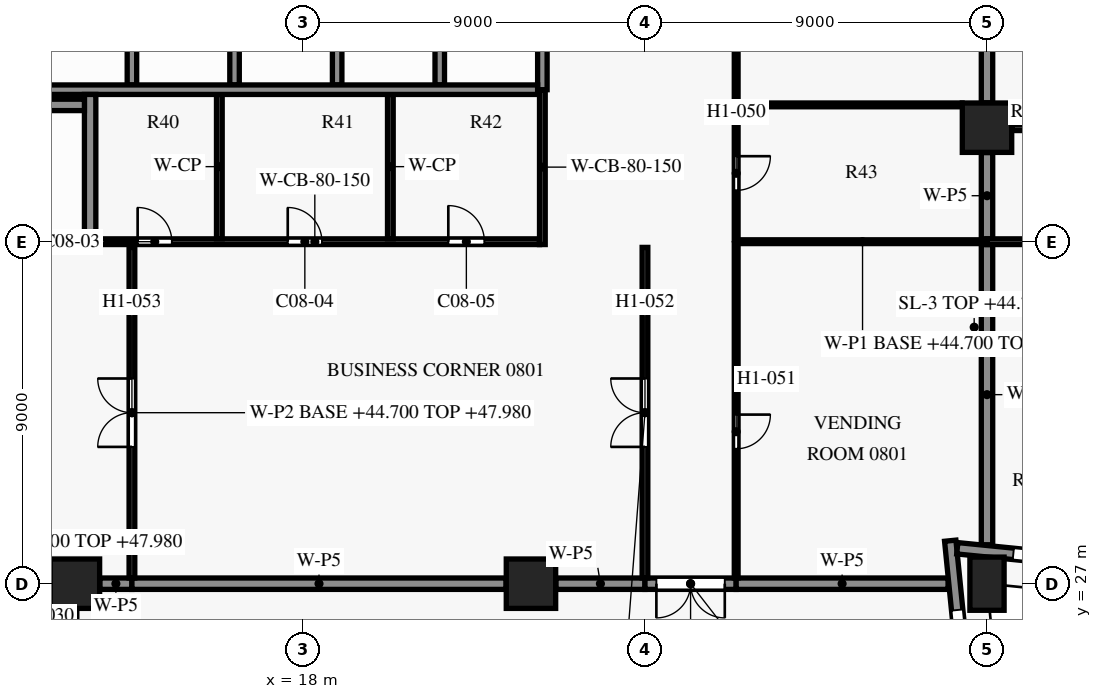
"""IFC4 building model, lengths in metres.
Left out: names, types, materials, properties, quantities, classifications, styles, units other than length and angle.
Written with IfcOpenShell. Run it as: python <this file> out.ifc"""

import sys

from ifc_helpers import new_model, si_unit, direction, frame, frame_2d, origin, origin_2d, place, context, subcontext, project, spatial, rectangle, extrude, element, fill, save


model = new_model("IFC4")
c1 = context("Model", 3, precision=1e-05, world=origin(), true_north=direction((0.0, 1.0)))
c2 = subcontext(c1, "Body", "Model", "MODEL_VIEW")
j1 = project(units=[si_unit("LENGTHUNIT", "METRE"), si_unit("PLANEANGLEUNIT", "RADIAN")], contexts=[c1])
p1 = place(None, origin())
s1 = spatial("IfcSite", under=j1, at=p1, CompositionType="ELEMENT")
p2 = place(p1, origin())
s2 = spatial("IfcBuilding", under=s1, at=p2, CompositionType="ELEMENT")
p3 = place(p2, frame((0.0, 0.0, 44.7)))
s3 = spatial("IfcBuildingStorey", under=s2, at=p3, CompositionType="ELEMENT", Elevation=44.7)
p4 = place(p3, frame((36.0, 27.0, 0.0), z_axis=(0.0, 0.0, 1.0), x_axis=(-0.0995038382, 0.995037178292, 0.0)))
e1 = element("IfcColumn", 1, at=p4, inside=s3, PredefinedType="COLUMN", context=c2, shape_type="SweptSolid", body=[
    extrude(rectangle(XDim=0.9, YDim=1.4, at=origin_2d()), origin(), (0.0, 0.0, 1.0), 3.6),
])
for number, where, z_axis, x_axis in (
    (2, (12.0, 27.0, 0.0), (0.0, 0.0, 1.0), (1.0, 0.0, 0.0)),
    (3, (24.0, 27.0, 0.0), (0.0, 0.0, 1.0), (1.0, 0.0, 0.0)),
    (4, (36.0, 39.0, 0.0), (0.0, 0.0, 1.0), (1.0, 0.0, 0.0)),
):
    element("IfcColumn", number, at=place(p3, frame(where, z_axis=z_axis, x_axis=x_axis)), inside=s3, PredefinedType="COLUMN", context=c2, shape_type="SweptSolid", body=[
        extrude(rectangle(XDim=1.3, YDim=1.3, at=origin_2d()), origin(), (0.0, 0.0, 1.0), 3.6),
    ])
p5 = place(p3, frame((35.033, 28.132, 0.0), z_axis=(0.0, 0.0, 1.0), x_axis=(0.099487051997, -0.995038856771, 0.0)))
e5 = element("IfcWall", 5, at=p5, inside=s3, PredefinedType="SOLIDWALL", context=c2, shape_type="SweptSolid", body=[
    extrude(rectangle(XDim=10.152, YDim=0.3, at=frame_2d((5.076, 0.0))), origin(), (0.0, 0.0, 1.0), 2.95),
])
p6 = place(p5, frame((1.833, 0.0, 0.15)))
e6 = element("IfcOpeningElement", 6, at=p6, cuts=e5, PredefinedType="OPENING", context=c2, shape_type="SweptSolid", body=[
    extrude(rectangle(XDim=3.3, YDim=2.4, at=frame_2d((1.65, 1.2))), frame((0.0, 0.16, 0.0), z_axis=(0.0, -1.0, 0.0), x_axis=(1.0, 0.0, 0.0)), (0.0, 0.0, 1.0), 0.32),
])
p7 = place(p5, frame((7.106, 0.0, 0.75)))
e7 = element("IfcOpeningElement", 7, at=p7, cuts=e5, PredefinedType="OPENING", context=c2, shape_type="SweptSolid", body=[
    extrude(rectangle(XDim=1.8, YDim=1.8, at=frame_2d((0.9, 0.9))), frame((0.0, 0.16, 0.0), z_axis=(0.0, -1.0, 0.0), x_axis=(1.0, 0.0, 0.0)), (0.0, 0.0, 1.0), 0.32),
])
p8 = place(p3, frame((45.015, 26.953, 0.0), z_axis=(0.0, 0.0, 1.0), x_axis=(-0.995036699177, 0.099508629231, 0.0)))
e8 = element("IfcWall", 8, at=p8, inside=s3, PredefinedType="SOLIDWALL", context=c2, shape_type="SweptSolid", body=[
    extrude(rectangle(XDim=9.846, YDim=0.3, at=frame_2d((4.923, 0.0))), origin(), (0.0, 0.0, 1.0), 2.95),
])
p9 = place(p8, frame((1.291, 0.0, 0.75)))
e9 = element("IfcOpeningElement", 9, at=p9, cuts=e8, PredefinedType="OPENING", context=c2, shape_type="SweptSolid", body=[
    extrude(rectangle(XDim=1.8, YDim=1.8, at=frame_2d((0.9, 0.9))), frame((0.0, 0.16, 0.0), z_axis=(0.0, -1.0, 0.0), x_axis=(1.0, 0.0, 0.0)), (0.0, 0.0, 1.0), 0.32),
])
p10 = place(p8, frame((5.064, 0.0, 0.15)))
e10 = element("IfcOpeningElement", 10, at=p10, cuts=e8, PredefinedType="OPENING", context=c2, shape_type="SweptSolid", body=[
    extrude(rectangle(XDim=3.3, YDim=2.4, at=frame_2d((1.65, 1.2))), frame((0.0, 0.16, 0.0), z_axis=(0.0, -1.0, 0.0), x_axis=(1.0, 0.0, 0.0)), (0.0, 0.0, 1.0), 0.32),
])
p11 = place(p3, frame((12.4, 36.0, 0.0), z_axis=(0.0, 0.0, 1.0), x_axis=(1.0, 0.0, 0.0)))
e11 = element("IfcWall", 11, at=p11, inside=s3, PredefinedType="SHEAR", context=c2, shape_type="SweptSolid", body=[
    extrude(rectangle(XDim=11.825, YDim=0.15, at=frame_2d((5.913, 0.0))), origin(), (0.0, 0.0, 1.0), 3.3),
])
p12 = place(p11, frame((1.25, 0.0, 0.0)))
e12 = element("IfcOpeningElement", 12, at=p12, cuts=e11, PredefinedType="OPENING", context=c2, shape_type="SweptSolid", body=[
    extrude(rectangle(XDim=0.9, YDim=2.1, at=frame_2d((0.45, 1.05))), frame((0.0, 0.085, 0.0), z_axis=(0.0, -1.0, 0.0), x_axis=(1.0, 0.0, 0.0)), (0.0, 0.0, 1.0), 0.17),
])
p13 = place(p11, frame((5.2, 0.0, 0.0)))
e13 = element("IfcOpeningElement", 13, at=p13, cuts=e11, PredefinedType="OPENING", context=c2, shape_type="SweptSolid", body=[
    extrude(rectangle(XDim=0.9, YDim=2.1, at=frame_2d((0.45, 1.05))), frame((0.0, 0.085, 0.0), z_axis=(0.0, -1.0, 0.0), x_axis=(1.0, 0.0, 0.0)), (0.0, 0.0, 1.0), 0.17),
])
p14 = place(p11, frame((9.425, 0.0, 0.0)))
e14 = element("IfcOpeningElement", 14, at=p14, cuts=e11, PredefinedType="OPENING", context=c2, shape_type="SweptSolid", body=[
    extrude(rectangle(XDim=0.95, YDim=2.1, at=frame_2d((0.475, 1.05))), frame((0.0, 0.085, 0.0), z_axis=(0.0, -1.0, 0.0), x_axis=(1.0, 0.0, 0.0)), (0.0, 0.0, 1.0), 0.17),
])
p15 = place(p3, frame((4.4, 36.0, 0.0), z_axis=(0.0, 0.0, 1.0), x_axis=(1.0, 0.0, 0.0)))
e15 = element("IfcWall", 15, at=p15, inside=s3, PredefinedType="SHEAR", context=c2, shape_type="SweptSolid", body=[
    extrude(rectangle(XDim=8.0, YDim=0.3, at=frame_2d((4.0, 0.0))), origin(), (0.0, 0.0, 1.0), 3.3),
])
p16 = place(p15, frame((0.3, 0.0, 0.0)))
e16 = element("IfcOpeningElement", 16, at=p16, cuts=e15, PredefinedType="OPENING", context=c2, shape_type="SweptSolid", body=[
    extrude(rectangle(XDim=1.5, YDim=2.2, at=frame_2d((0.75, 1.1))), frame((0.0, 0.16, 0.0), z_axis=(0.0, -1.0, 0.0), x_axis=(1.0, 0.0, 0.0)), (0.0, 0.0, 1.0), 0.32),
])
p17 = place(p3, frame((4.55, 39.6, 0.0), z_axis=(0.0, 0.0, 1.0), x_axis=(1.0, 0.0, 0.0)))
e17 = element("IfcWall", 17, at=p17, inside=s3, PredefinedType="SHEAR", context=c2, shape_type="SweptSolid", body=[
    extrude(rectangle(XDim=7.7, YDim=0.3, at=frame_2d((3.85, 0.0))), origin(), (0.0, 0.0, 1.0), 3.3),
])
p18 = place(p3, frame((8.1, 40.0, 0.0), z_axis=(0.0, 0.0, 1.0), x_axis=(1.0, 0.0, 0.0)))
e18 = element("IfcWall", 18, at=p18, inside=s3, PredefinedType="SHEAR", context=c2, shape_type="SweptSolid", body=[
    extrude(rectangle(XDim=16.075, YDim=0.25, at=frame_2d((8.038, 0.0))), origin(), (0.0, 0.0, 1.0), 3.3),
])
p19 = place(p3, frame((12.4, 36.15, 0.0), z_axis=(0.0, 0.0, 1.0), x_axis=(0.0, 1.0, 0.0)))
e19 = element("IfcWall", 19, at=p19, inside=s3, PredefinedType="SHEAR", context=c2, shape_type="SweptSolid", body=[
    extrude(rectangle(XDim=3.725, YDim=0.3, at=frame_2d((1.863, 0.0))), origin(), (0.0, 0.0, 1.0), 3.3),
])
p20 = place(p3, frame((13.5, 40.125, 0.0), z_axis=(0.0, 0.0, 1.0), x_axis=(0.0, 1.0, 0.0)))
e20 = element("IfcWall", 20, at=p20, inside=s3, PredefinedType="SHEAR", context=c2, shape_type="SweptSolid", body=[
    extrude(rectangle(XDim=2.95, YDim=0.25, at=frame_2d((1.475, 0.0))), origin(), (0.0, 0.0, 1.0), 3.3),
])
p21 = place(p3, frame((15.8, 36.075, 0.0), z_axis=(0.0, 0.0, 1.0), x_axis=(0.0, 1.0, 0.0)))
e21 = element("IfcWall", 21, at=p21, inside=s3, PredefinedType="PARTITIONING", context=c2, shape_type="SweptSolid", body=[
    extrude(rectangle(XDim=3.8, YDim=0.15, at=frame_2d((1.9, 0.0))), origin(), (0.0, 0.0, 1.0), 3.3),
])
for number, where, z_axis, x_axis in (
    (22, (16.2, 40.125, 0.0), (0.0, 0.0, 1.0), (0.0, 1.0, 0.0)),
    (23, (18.9, 40.125, 0.0), (0.0, 0.0, 1.0), (0.0, 1.0, 0.0)),
):
    element("IfcWall", number, at=place(p3, frame(where, z_axis=z_axis, x_axis=x_axis)), inside=s3, PredefinedType="SHEAR", context=c2, shape_type="SweptSolid", body=[
        extrude(rectangle(XDim=2.95, YDim=0.25, at=frame_2d((1.475, 0.0))), origin(), (0.0, 0.0, 1.0), 3.3),
    ])
p22 = place(p3, frame((20.3, 36.075, 0.0), z_axis=(0.0, 0.0, 1.0), x_axis=(0.0, 1.0, 0.0)))
e24 = element("IfcWall", 24, at=p22, inside=s3, PredefinedType="PARTITIONING", context=c2, shape_type="SweptSolid", body=[
    extrude(rectangle(XDim=3.8, YDim=0.15, at=frame_2d((1.9, 0.0))), origin(), (0.0, 0.0, 1.0), 3.3),
])
p23 = place(p3, frame((21.6, 40.125, 0.0), z_axis=(0.0, 0.0, 1.0), x_axis=(0.0, 1.0, 0.0)))
e25 = element("IfcWall", 25, at=p23, inside=s3, PredefinedType="SHEAR", context=c2, shape_type="SweptSolid", body=[
    extrude(rectangle(XDim=2.95, YDim=0.25, at=frame_2d((1.475, 0.0))), origin(), (0.0, 0.0, 1.0), 3.3),
])
p24 = place(p3, frame((24.3, 35.925, 0.0), z_axis=(0.0, 0.0, 1.0), x_axis=(0.0, 1.0, 0.0)))
e26 = element("IfcWall", 26, at=p24, inside=s3, PredefinedType="SHEAR", context=c2, shape_type="SweptSolid", body=[
    extrude(rectangle(XDim=4.075, YDim=0.15, at=frame_2d((2.038, 0.0))), origin(), (0.0, 0.0, 1.0), 3.3),
])
p25 = place(p3, frame((24.3, 40.0, 0.0), z_axis=(0.0, 0.0, 1.0), x_axis=(0.0, 1.0, 0.0)))
e27 = element("IfcWall", 27, at=p25, inside=s3, PredefinedType="SHEAR", context=c2, shape_type="SweptSolid", body=[
    extrude(rectangle(XDim=3.325, YDim=0.25, at=frame_2d((1.663, 0.0))), origin(), (0.0, 0.0, 1.0), 3.3),
])
p26 = place(p3, frame((12.0, 26.345, 0.0), z_axis=(0.0, 0.0, 1.0), x_axis=(0.0, -1.0, 0.0)))
e28 = element("IfcWall", 28, at=p26, inside=s3, PredefinedType="PARTITIONING", context=c2, shape_type="SweptSolid", body=[
    extrude(rectangle(XDim=3.845, YDim=0.1, at=frame_2d((1.922, 0.0))), origin(), (0.0, 0.0, 1.0), 2.58),
])
p27 = place(p26, frame((1.145, 0.0, 0.0)))
e29 = element("IfcOpeningElement", 29, at=p27, cuts=e28, PredefinedType="OPENING", context=c2, shape_type="SweptSolid", body=[
    extrude(rectangle(XDim=0.9, YDim=2.1, at=frame_2d((0.45, 1.05))), frame((0.0, 0.06, 0.0), z_axis=(0.0, -1.0, 0.0), x_axis=(1.0, 0.0, 0.0)), (0.0, 0.0, 1.0), 0.12),
])
p28 = place(p3, frame((13.5, 27.0, 0.0), z_axis=(0.0, 0.0, 1.0), x_axis=(-1.0, 0.0, 0.0)))
e30 = element("IfcWall", 30, at=p28, inside=s3, PredefinedType="PARTITIONING", context=c2, shape_type="SweptSolid", body=[
    extrude(rectangle(XDim=0.845, YDim=0.3, at=frame_2d((0.422, 0.0))), origin(), (0.0, 0.0, 1.0), 2.58),
])
p29 = place(p3, frame((23.345, 27.0, 0.0), z_axis=(0.0, 0.0, 1.0), x_axis=(-1.0, 0.0, 0.0)))
e31 = element("IfcWall", 31, at=p29, inside=s3, PredefinedType="PARTITIONING", context=c2, shape_type="SweptSolid", body=[
    extrude(rectangle(XDim=9.845, YDim=0.3, at=frame_2d((4.922, 0.0))), origin(), (0.0, 0.0, 1.0), 2.58),
])
p30 = place(p3, frame((27.0, 27.0, 0.0), z_axis=(0.0, 0.0, 1.0), x_axis=(-1.0, 0.0, 0.0)))
e32 = element("IfcWall", 32, at=p30, inside=s3, PredefinedType="PARTITIONING", context=c2, shape_type="SweptSolid", body=[
    extrude(rectangle(XDim=2.345, YDim=0.3, at=frame_2d((1.172, 0.0))), origin(), (0.0, 0.0, 1.0), 2.58),
])
p31 = place(p3, frame((29.4, 27.0, 0.0), z_axis=(0.0, 0.0, 1.0), x_axis=(-1.0, 0.0, 0.0)))
e33 = element("IfcWall", 33, at=p31, inside=s3, PredefinedType="PARTITIONING", context=c2, shape_type="SweptSolid", body=[
    extrude(rectangle(XDim=2.4, YDim=0.3, at=frame_2d((1.2, 0.0))), origin(), (0.0, 0.0, 1.0), 2.58),
])
p32 = place(p31, frame((0.3, 0.0, 0.0)))
e34 = element("IfcOpeningElement", 34, at=p32, cuts=e33, PredefinedType="OPENING", context=c2, shape_type="SweptSolid", body=[
    extrude(rectangle(XDim=1.8, YDim=2.1, at=frame_2d((0.9, 1.05))), frame((0.0, 0.16, 0.0), z_axis=(0.0, -1.0, 0.0), x_axis=(1.0, 0.0, 0.0)), (0.0, 0.0, 1.0), 0.32),
])
p33 = place(p3, frame((34.975, 27.0, 0.0), z_axis=(0.0, 0.0, 1.0), x_axis=(-1.0, 0.0, 0.0)))
e35 = element("IfcWall", 35, at=p33, inside=s3, PredefinedType="PARTITIONING", context=c2, shape_type="SweptSolid", body=[
    extrude(rectangle(XDim=5.575, YDim=0.3, at=frame_2d((2.788, 0.0))), origin(), (0.0, 0.0, 1.0), 2.58),
])
p34 = place(p3, frame((27.0, 27.15, 0.0), z_axis=(0.0, 0.0, 1.0), x_axis=(0.0, 1.0, 0.0)))
e36 = element("IfcWall", 36, at=p34, inside=s3, PredefinedType="PARTITIONING", context=c2, shape_type="SweptSolid", body=[
    extrude(rectangle(XDim=8.7, YDim=0.15, at=frame_2d((4.35, 0.0))), origin(), (0.0, 0.0, 1.0), 3.28),
])
p35 = place(p34, frame((3.45, 0.0, 0.0)))
e37 = element("IfcOpeningElement", 37, at=p35, cuts=e36, PredefinedType="OPENING", context=c2, shape_type="SweptSolid", body=[
    extrude(rectangle(XDim=1.8, YDim=2.1, at=frame_2d((0.9, 1.05))), frame((0.0, 0.085, 0.0), z_axis=(0.0, -1.0, 0.0), x_axis=(1.0, 0.0, 0.0)), (0.0, 0.0, 1.0), 0.17),
])
p36 = place(p3, frame((13.5, 27.15, 0.0), z_axis=(0.0, 0.0, 1.0), x_axis=(0.0, 1.0, 0.0)))
e38 = element("IfcWall", 38, at=p36, inside=s3, PredefinedType="PARTITIONING", context=c2, shape_type="SweptSolid", body=[
    extrude(rectangle(XDim=8.7, YDim=0.15, at=frame_2d((4.35, 0.0))), origin(), (0.0, 0.0, 1.0), 3.28),
])
p37 = place(p36, frame((3.45, 0.0, 0.0)))
e39 = element("IfcOpeningElement", 39, at=p37, cuts=e38, PredefinedType="OPENING", context=c2, shape_type="SweptSolid", body=[
    extrude(rectangle(XDim=1.8, YDim=2.1, at=frame_2d((0.9, 1.05))), frame((0.0, 0.085, 0.0), z_axis=(0.0, -1.0, 0.0), x_axis=(1.0, 0.0, 0.0)), (0.0, 0.0, 1.0), 0.17),
])
p38 = place(p3, frame((36.0, 35.925, 0.0), z_axis=(0.0, 0.0, 1.0), x_axis=(0.0, -1.0, 0.0)))
e40 = element("IfcWall", 40, at=p38, inside=s3, PredefinedType="PARTITIONING", context=c2, shape_type="SweptSolid", body=[
    extrude(rectangle(XDim=7.9, YDim=0.3, at=frame_2d((3.95, 0.0))), origin(), (0.0, 0.0, 1.0), 2.58),
])
p39 = place(p3, frame((29.4, 35.95, 0.0), z_axis=(0.0, 0.0, 1.0), x_axis=(0.0, -1.0, 0.0)))
e41 = element("IfcWall", 41, at=p39, inside=s3, PredefinedType="PARTITIONING", context=c2, shape_type="SweptSolid", body=[
    extrude(rectangle(XDim=8.8, YDim=0.1, at=frame_2d((4.4, 0.0))), origin(), (0.0, 0.0, 1.0), 3.28),
])
p40 = place(p39, frame((4.5, 0.0, 0.0)))
e42 = element("IfcOpeningElement", 42, at=p40, cuts=e41, PredefinedType="OPENING", context=c2, shape_type="SweptSolid", body=[
    extrude(rectangle(XDim=0.9, YDim=2.1, at=frame_2d((0.45, 1.05))), frame((0.0, 0.06, 0.0), z_axis=(0.0, -1.0, 0.0), x_axis=(1.0, 0.0, 0.0)), (0.0, 0.0, 1.0), 0.12),
])
p41 = place(p3, frame((36.0, 36.0, 0.0), z_axis=(0.0, 0.0, 1.0), x_axis=(-1.0, 0.0, 0.0)))
e43 = element("IfcWall", 43, at=p41, inside=s3, PredefinedType="PARTITIONING", context=c2, shape_type="SweptSolid", body=[
    extrude(rectangle(XDim=6.55, YDim=0.1, at=frame_2d((3.275, 0.0))), origin(), (0.0, 0.0, 1.0), 2.58),
])
p42 = place(p3, frame((36.0, 36.0, 0.0), z_axis=(0.0, 0.0, 1.0), x_axis=(1.0, 0.0, 0.0)))
e44 = element("IfcWall", 44, at=p42, inside=s3, PredefinedType="PARTITIONING", context=c2, shape_type="SweptSolid", body=[
    extrude(rectangle(XDim=2.175, YDim=0.15, at=frame_2d((1.087, 0.0))), origin(), (0.0, 0.0, 1.0), 2.58),
])
p43 = place(p3, frame((36.0, 38.345, 0.0), z_axis=(0.0, 0.0, 1.0), x_axis=(0.0, -1.0, 0.0)))
e45 = element("IfcWall", 45, at=p43, inside=s3, PredefinedType="PARTITIONING", context=c2, shape_type="SweptSolid", body=[
    extrude(rectangle(XDim=2.27, YDim=0.3, at=frame_2d((1.135, 0.0))), origin(), (0.0, 0.0, 1.0), 2.58),
])
p44 = place(p3, frame((38.1, 39.0, 0.0), z_axis=(0.0, 0.0, 1.0), x_axis=(-1.0, 0.0, 0.0)))
e46 = element("IfcWall", 46, at=p44, inside=s3, PredefinedType="PARTITIONING", context=c2, shape_type="SweptSolid", body=[
    extrude(rectangle(XDim=1.445, YDim=0.15, at=frame_2d((0.723, 0.0))), origin(), (0.0, 0.0, 1.0), 2.58),
])
p45 = place(p3, frame((29.4, 39.55, 0.0), z_axis=(0.0, 0.0, 1.0), x_axis=(0.0, -1.0, 0.0)))
e47 = element("IfcWall", 47, at=p45, inside=s3, PredefinedType="PARTITIONING", context=c2, shape_type="SweptSolid", body=[
    extrude(rectangle(XDim=3.5, YDim=0.1, at=frame_2d((1.75, 0.0))), origin(), (0.0, 0.0, 1.0), 3.28),
])
p46 = place(p45, frame((1.3, 0.0, 0.0)))
e48 = element("IfcOpeningElement", 48, at=p46, cuts=e47, PredefinedType="OPENING", context=c2, shape_type="SweptSolid", body=[
    extrude(rectangle(XDim=0.9, YDim=2.1, at=frame_2d((0.45, 1.05))), frame((0.0, 0.06, 0.0), z_axis=(0.0, -1.0, 0.0), x_axis=(1.0, 0.0, 0.0)), (0.0, 0.0, 1.0), 0.12),
])
p47 = place(p3, frame((35.345, 39.6, 0.0), z_axis=(0.0, 0.0, 1.0), x_axis=(-1.0, 0.0, 0.0)))
e49 = element("IfcWall", 49, at=p47, inside=s3, PredefinedType="PARTITIONING", context=c2, shape_type="SweptSolid", body=[
    extrude(rectangle(XDim=5.895, YDim=0.1, at=frame_2d((2.948, 0.0))), origin(), (0.0, 0.0, 1.0), 3.28),
])
p48 = place(p3, frame((29.4, 43.15, 0.0), z_axis=(0.0, 0.0, 1.0), x_axis=(0.0, -1.0, 0.0)))
e50 = element("IfcWall", 50, at=p48, inside=s3, PredefinedType="PARTITIONING", context=c2, shape_type="SweptSolid", body=[
    extrude(rectangle(XDim=3.5, YDim=0.1, at=frame_2d((1.75, 0.0))), origin(), (0.0, 0.0, 1.0), 3.28),
])
p49 = place(p3, frame((36.0, 43.15, 0.0), z_axis=(0.0, 0.0, 1.0), x_axis=(0.0, -1.0, 0.0)))
e51 = element("IfcWall", 51, at=p49, inside=s3, PredefinedType="PARTITIONING", context=c2, shape_type="SweptSolid", body=[
    extrude(rectangle(XDim=3.495, YDim=0.3, at=frame_2d((1.748, 0.0))), origin(), (0.0, 0.0, 1.0), 2.58),
])
p50 = place(p6, origin())
e52 = element("IfcWindow", 52, at=p50, inside=s3, PartitioningType="SINGLE_PANEL", PredefinedType="WINDOW", context=c2, shape_type="SweptSolid", body=[
    extrude(rectangle(XDim=3.3, YDim=2.4, at=frame_2d((1.65, 1.2))), frame((0.0, 0.03, 0.0), z_axis=(0.0, -1.0, 0.0), x_axis=(1.0, 0.0, 0.0)), (0.0, 0.0, 1.0), 0.06),
])
fill(e6, e52)
p51 = place(p10, origin())
e53 = element("IfcWindow", 53, at=p51, inside=s3, PartitioningType="SINGLE_PANEL", PredefinedType="WINDOW", context=c2, shape_type="SweptSolid", body=[
    extrude(rectangle(XDim=3.3, YDim=2.4, at=frame_2d((1.65, 1.2))), frame((0.0, 0.03, 0.0), z_axis=(0.0, -1.0, 0.0), x_axis=(1.0, 0.0, 0.0)), (0.0, 0.0, 1.0), 0.06),
])
fill(e10, e53)
p52 = place(p12, origin())
e54 = element("IfcDoor", 54, at=p52, inside=s3, OperationType="SINGLE_SWING_RIGHT", PredefinedType="DOOR", context=c2, shape_type="SweptSolid", body=[
    extrude(rectangle(XDim=0.9, YDim=2.1, at=frame_2d((0.45, 1.05))), frame((0.0, 0.025, 0.0), z_axis=(0.0, -1.0, 0.0), x_axis=(1.0, 0.0, 0.0)), (0.0, 0.0, 1.0), 0.05),
])
fill(e12, e54)
p53 = place(p13, origin())
e55 = element("IfcDoor", 55, at=p53, inside=s3, OperationType="SINGLE_SWING_LEFT", PredefinedType="DOOR", context=c2, shape_type="SweptSolid", body=[
    extrude(rectangle(XDim=0.9, YDim=2.1, at=frame_2d((0.45, 1.05))), frame((0.0, 0.025, 0.0), z_axis=(0.0, -1.0, 0.0), x_axis=(1.0, 0.0, 0.0)), (0.0, 0.0, 1.0), 0.05),
])
fill(e13, e55)
p54 = place(p14, origin())
e56 = element("IfcDoor", 56, at=p54, inside=s3, OperationType="SINGLE_SWING_RIGHT", PredefinedType="DOOR", context=c2, shape_type="SweptSolid", body=[
    extrude(rectangle(XDim=0.95, YDim=2.1, at=frame_2d((0.475, 1.05))), frame((0.0, 0.025, 0.0), z_axis=(0.0, -1.0, 0.0), x_axis=(1.0, 0.0, 0.0)), (0.0, 0.0, 1.0), 0.05),
])
fill(e14, e56)
p55 = place(p46, origin())
e57 = element("IfcDoor", 57, at=p55, inside=s3, OperationType="SINGLE_SWING_RIGHT", PredefinedType="DOOR", context=c2, shape_type="SweptSolid", body=[
    extrude(rectangle(XDim=0.9, YDim=2.1, at=frame_2d((0.45, 1.05))), frame((0.0, 0.025, 0.0), z_axis=(0.0, -1.0, 0.0), x_axis=(1.0, 0.0, 0.0)), (0.0, 0.0, 1.0), 0.05),
])
fill(e48, e57)
p56 = place(p40, origin())
e58 = element("IfcDoor", 58, at=p56, inside=s3, OperationType="SINGLE_SWING_LEFT", PredefinedType="DOOR", context=c2, shape_type="SweptSolid", body=[
    extrude(rectangle(XDim=0.9, YDim=2.1, at=frame_2d((0.45, 1.05))), frame((0.0, 0.025, 0.0), z_axis=(0.0, -1.0, 0.0), x_axis=(1.0, 0.0, 0.0)), (0.0, 0.0, 1.0), 0.05),
])
fill(e42, e58)
p57 = place(p35, origin())
e59 = element("IfcDoor", 59, at=p57, inside=s3, OperationType="DOUBLE_DOOR_SINGLE_SWING", PredefinedType="DOOR", context=c2, shape_type="SweptSolid", body=[
    extrude(rectangle(XDim=1.8, YDim=2.1, at=frame_2d((0.9, 1.05))), frame((0.0, 0.025, 0.0), z_axis=(0.0, -1.0, 0.0), x_axis=(1.0, 0.0, 0.0)), (0.0, 0.0, 1.0), 0.05),
])
fill(e37, e59)
p58 = place(p37, origin())
e60 = element("IfcDoor", 60, at=p58, inside=s3, OperationType="DOUBLE_DOOR_SINGLE_SWING", PredefinedType="DOOR", context=c2, shape_type="SweptSolid", body=[
    extrude(rectangle(XDim=1.8, YDim=2.1, at=frame_2d((0.9, 1.05))), frame((0.0, 0.025, 0.0), z_axis=(0.0, -1.0, 0.0), x_axis=(1.0, 0.0, 0.0)), (0.0, 0.0, 1.0), 0.05),
])
fill(e39, e60)
p59 = place(p32, origin())
e61 = element("IfcDoor", 61, at=p59, inside=s3, OperationType="DOUBLE_DOOR_SINGLE_SWING", PredefinedType="DOOR", context=c2, shape_type="SweptSolid", body=[
    extrude(rectangle(XDim=1.8, YDim=2.1, at=frame_2d((0.9, 1.05))), frame((0.0, 0.025, 0.0), z_axis=(0.0, -1.0, 0.0), x_axis=(1.0, 0.0, 0.0)), (0.0, 0.0, 1.0), 0.05),
])
fill(e34, e61)
save(model, sys.argv[1])
